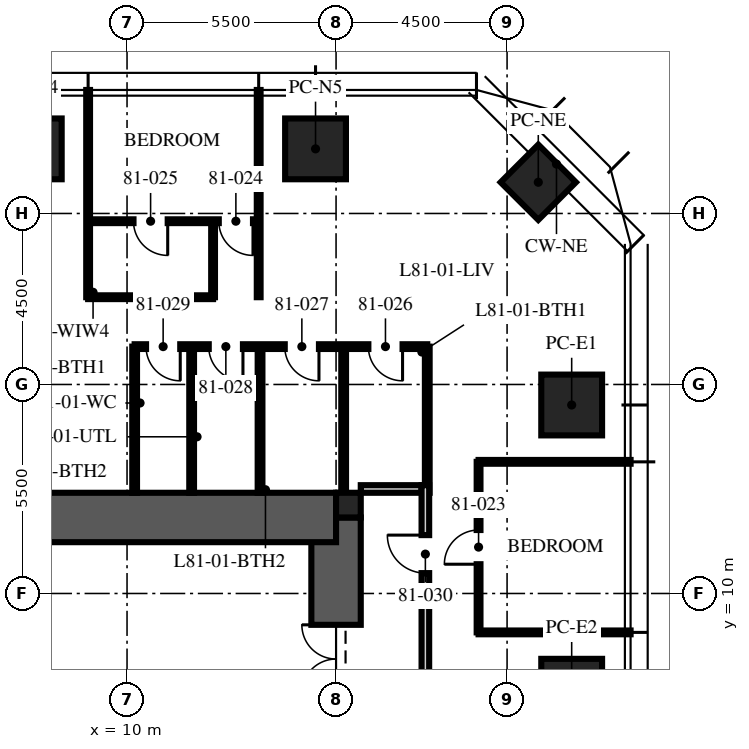
"""IFC4 building model, lengths in metres.
Left out: names, types, materials, properties, quantities, classifications, styles, units other than length and angle.
Written with IfcOpenShell. Run it as: python <this file> out.ifc"""

import sys

from ifc_helpers import new_model, si_unit, direction, frame, frame_2d, origin, origin_2d, place, context, subcontext, project, spatial, rectangle, extrude, element, fill, save


model = new_model("IFC4")
c1 = context("Model", 3, precision=1e-05, world=origin(), true_north=direction((0.0, 1.0)))
c2 = subcontext(c1, "Body", "Model", "MODEL_VIEW")
j1 = project(units=[si_unit("LENGTHUNIT", "METRE"), si_unit("PLANEANGLEUNIT", "RADIAN")], contexts=[c1])
p1 = place(None, origin())
s1 = spatial("IfcSite", under=j1, at=p1, CompositionType="ELEMENT")
p2 = place(p1, origin())
s2 = spatial("IfcBuilding", under=s1, at=p2, CompositionType="ELEMENT")
p3 = place(p2, frame((0.0, 0.0, 323.25)))
s3 = spatial("IfcBuildingStorey", under=s2, at=p3, CompositionType="ELEMENT", Elevation=323.25)
p4 = place(p3, frame((15.5, -12.0, -0.25), z_axis=(0.0, 0.0, 1.0), x_axis=(0.0, 1.0, 0.0)))
e1 = element("IfcWall", 1, at=p4, inside=s3, PredefinedType="SHEAR", context=c2, shape_type="SweptSolid", body=[
    extrude(rectangle(XDim=24.0, YDim=1.3, at=frame_2d((12.0, 0.0))), origin(), (0.0, 0.0, 1.0), 3.75),
])
p5 = place(p4, frame((3.125, 0.0, 0.25)))
e2 = element("IfcOpeningElement", 2, at=p5, cuts=e1, PredefinedType="OPENING", context=c2, shape_type="SweptSolid", body=[
    extrude(rectangle(XDim=1.2, YDim=2.1, at=frame_2d((0.6, 1.05))), frame((0.0, 0.66, 0.0), z_axis=(0.0, -1.0, 0.0), x_axis=(1.0, 0.0, 0.0)), (0.0, 0.0, 1.0), 1.32),
])
p6 = place(p4, frame((19.375, 0.0, 0.25)))
e3 = element("IfcOpeningElement", 3, at=p6, cuts=e1, PredefinedType="OPENING", context=c2, shape_type="SweptSolid", body=[
    extrude(rectangle(XDim=1.8, YDim=2.1, at=frame_2d((0.9, 1.05))), frame((0.0, 0.66, 0.0), z_axis=(0.0, -1.0, 0.0), x_axis=(1.0, 0.0, 0.0)), (0.0, 0.0, 1.0), 1.32),
])
p7 = place(p3, frame((-15.5, 12.0, -0.25), z_axis=(0.0, 0.0, 1.0), x_axis=(1.0, 0.0, 0.0)))
e4 = element("IfcWall", 4, at=p7, inside=s3, PredefinedType="SHEAR", context=c2, shape_type="SweptSolid", body=[
    extrude(rectangle(XDim=31.0, YDim=1.3, at=frame_2d((15.5, 0.0))), origin(), (0.0, 0.0, 1.0), 3.75),
])
p8 = place(p3, frame((15.825, 12.325, -0.25), z_axis=(0.0, 0.0, 1.0), x_axis=(1.0, 0.0, 0.0)))
e5 = element("IfcColumn", 5, at=p8, inside=s3, PredefinedType="COLUMN", context=c2, shape_type="SweptSolid", body=[
    extrude(rectangle(XDim=0.65, YDim=0.65, at=origin_2d()), origin(), (0.0, 0.0, 1.0), 3.75),
])
for number, where, z_axis, x_axis in (
    (6, (7.48, 21.7, 0.0), (0.0, 0.0, 1.0), (1.0, 0.0, 0.0)),
    (7, (14.96, 21.7, 0.0), (0.0, 0.0, 1.0), (1.0, 0.0, 0.0)),
    (8, (21.7, 14.96, 0.0), (0.0, 0.0, 1.0), (0.0, 1.0, 0.0)),
    (9, (21.7, 7.48, 0.0), (0.0, 0.0, 1.0), (0.0, 1.0, 0.0)),
):
    element("IfcColumn", number, at=place(p3, frame(where, z_axis=z_axis, x_axis=x_axis)), inside=s3, PredefinedType="COLUMN", context=c2, shape_type="SweptSolid", body=[
        extrude(rectangle(XDim=1.6, YDim=1.6, at=origin_2d()), origin(), (0.0, 0.0, 1.0), 3.75),
    ])
p9 = place(p3, frame((20.821, 20.821, 0.0), z_axis=(0.0, 0.0, 1.0), x_axis=(0.707106781187, -0.707106781187, 0.0)))
e10 = element("IfcColumn", 10, at=p9, inside=s3, PredefinedType="COLUMN", context=c2, shape_type="SweptSolid", body=[
    extrude(rectangle(XDim=1.4, YDim=1.4, at=origin_2d()), origin(), (0.0, 0.0, 1.0), 3.75),
])
p10 = place(p3, frame((16.15, 12.75, 0.0), z_axis=(0.0, 0.0, 1.0), x_axis=(1.0, 0.0, 0.0)))
e11 = element("IfcWall", 11, at=p10, inside=s3, PredefinedType="PARTITIONING", context=c2, shape_type="SweptSolid", body=[
    extrude(rectangle(XDim=1.6, YDim=0.2, at=frame_2d((0.8, 0.0))), origin(), (0.0, 0.0, 1.0), 2.6),
])
for number, where, z_axis, x_axis in (
    (12, (19.25, 8.976, 0.0), (0.0, 0.0, 1.0), (1.0, 0.0, 0.0)),
    (13, (19.25, 13.464, 0.0), (0.0, 0.0, 1.0), (1.0, 0.0, 0.0)),
):
    element("IfcWall", number, at=place(p3, frame(where, z_axis=z_axis, x_axis=x_axis)), inside=s3, PredefinedType="PARTITIONING", context=c2, shape_type="SweptSolid", body=[
        extrude(rectangle(XDim=4.0, YDim=0.1, at=frame_2d((2.0, 0.0))), origin(), (0.0, 0.0, 1.0), 3.01),
    ])
for number, where, z_axis, x_axis in (
    (14, (13.464, 17.796, 0.0), (0.0, 0.0, 1.0), (0.0, 1.0, 0.0)),
    (15, (8.976, 17.796, 0.0), (0.0, 0.0, 1.0), (0.0, 1.0, 0.0)),
):
    element("IfcWall", number, at=place(p3, frame(where, z_axis=z_axis, x_axis=x_axis)), inside=s3, PredefinedType="PARTITIONING", context=c2, shape_type="SweptSolid", body=[
        extrude(rectangle(XDim=5.454, YDim=0.1, at=frame_2d((2.727, 0.0))), origin(), (0.0, 0.0, 1.0), 3.01),
    ])
p11 = place(p3, frame((19.25, 8.976, 0.0), z_axis=(0.0, 0.0, 1.0), x_axis=(0.0, 1.0, 0.0)))
e16 = element("IfcWall", 16, at=p11, inside=s3, PredefinedType="PARTITIONING", context=c2, shape_type="SweptSolid", body=[
    extrude(rectangle(XDim=4.488, YDim=0.1, at=frame_2d((2.244, 0.0))), origin(), (0.0, 0.0, 1.0), 2.91),
])
p12 = place(p11, frame((1.794, 0.0, 0.0)))
e17 = element("IfcOpeningElement", 17, at=p12, cuts=e16, PredefinedType="OPENING", context=c2, shape_type="SweptSolid", body=[
    extrude(rectangle(XDim=0.9, YDim=2.1, at=frame_2d((0.45, 1.05))), frame((0.0, 0.06, 0.0), z_axis=(0.0, -1.0, 0.0), x_axis=(1.0, 0.0, 0.0)), (0.0, 0.0, 1.0), 0.12),
])
p13 = place(p3, frame((13.464, 19.796, 0.0), z_axis=(0.0, 0.0, 1.0), x_axis=(-1.0, 0.0, 0.0)))
e18 = element("IfcWall", 18, at=p13, inside=s3, PredefinedType="PARTITIONING", context=c2, shape_type="SweptSolid", body=[
    extrude(rectangle(XDim=4.488, YDim=0.1, at=frame_2d((2.244, 0.0))), origin(), (0.0, 0.0, 1.0), 2.91),
])
p14 = place(p13, frame((0.15, 0.0, 0.0)))
e19 = element("IfcOpeningElement", 19, at=p14, cuts=e18, PredefinedType="OPENING", context=c2, shape_type="SweptSolid", body=[
    extrude(rectangle(XDim=0.9, YDim=2.1, at=frame_2d((0.45, 1.05))), frame((0.0, 0.06, 0.0), z_axis=(0.0, -1.0, 0.0), x_axis=(1.0, 0.0, 0.0)), (0.0, 0.0, 1.0), 0.12),
])
p15 = place(p13, frame((2.394, 0.0, 0.0)))
e20 = element("IfcOpeningElement", 20, at=p15, cuts=e18, PredefinedType="OPENING", context=c2, shape_type="SweptSolid", body=[
    extrude(rectangle(XDim=0.9, YDim=2.1, at=frame_2d((0.45, 1.05))), frame((0.0, 0.06, 0.0), z_axis=(0.0, -1.0, 0.0), x_axis=(1.0, 0.0, 0.0)), (0.0, 0.0, 1.0), 0.12),
])
p16 = place(p3, frame((12.264, 17.796, 0.0), z_axis=(0.0, 0.0, 1.0), x_axis=(0.0, 1.0, 0.0)))
e21 = element("IfcWall", 21, at=p16, inside=s3, PredefinedType="PARTITIONING", context=c2, shape_type="SweptSolid", body=[
    extrude(rectangle(XDim=2.0, YDim=0.1, at=frame_2d((1.0, 0.0))), origin(), (0.0, 0.0, 1.0), 3.5),
])
p17 = place(p3, frame((12.264, 17.796, 0.0), z_axis=(0.0, 0.0, 1.0), x_axis=(-1.0, 0.0, 0.0)))
e22 = element("IfcWall", 22, at=p17, inside=s3, PredefinedType="PARTITIONING", context=c2, shape_type="SweptSolid", body=[
    extrude(rectangle(XDim=3.288, YDim=0.1, at=frame_2d((1.644, 0.0))), origin(), (0.0, 0.0, 1.0), 2.91),
])
p18 = place(p3, frame((17.9, 16.496, 0.0), z_axis=(0.0, 0.0, 1.0), x_axis=(-1.0, 0.0, 0.0)))
e23 = element("IfcWall", 23, at=p18, inside=s3, PredefinedType="PARTITIONING", context=c2, shape_type="SweptSolid", body=[
    extrude(rectangle(XDim=7.7, YDim=0.125, at=frame_2d((3.85, 0.0))), origin(), (0.0, 0.0, 1.0), 2.9),
])
p19 = place(p18, frame((0.65, 0.0, 0.0)))
e24 = element("IfcOpeningElement", 24, at=p19, cuts=e23, PredefinedType="OPENING", context=c2, shape_type="SweptSolid", body=[
    extrude(rectangle(XDim=0.9, YDim=2.1, at=frame_2d((0.45, 1.05))), frame((0.0, 0.073, 0.0), z_axis=(0.0, -1.0, 0.0), x_axis=(1.0, 0.0, 0.0)), (0.0, 0.0, 1.0), 0.145),
])
p20 = place(p18, frame((2.85, 0.0, 0.0)))
e25 = element("IfcOpeningElement", 25, at=p20, cuts=e23, PredefinedType="OPENING", context=c2, shape_type="SweptSolid", body=[
    extrude(rectangle(XDim=0.9, YDim=2.1, at=frame_2d((0.45, 1.05))), frame((0.0, 0.073, 0.0), z_axis=(0.0, -1.0, 0.0), x_axis=(1.0, 0.0, 0.0)), (0.0, 0.0, 1.0), 0.145),
])
p21 = place(p18, frame((4.85, 0.0, 0.0)))
e26 = element("IfcOpeningElement", 26, at=p21, cuts=e23, PredefinedType="OPENING", context=c2, shape_type="SweptSolid", body=[
    extrude(rectangle(XDim=0.9, YDim=2.1, at=frame_2d((0.45, 1.05))), frame((0.0, 0.073, 0.0), z_axis=(0.0, -1.0, 0.0), x_axis=(1.0, 0.0, 0.0)), (0.0, 0.0, 1.0), 0.145),
])
p22 = place(p18, frame((6.5, 0.0, 0.0)))
e27 = element("IfcOpeningElement", 27, at=p22, cuts=e23, PredefinedType="OPENING", context=c2, shape_type="SweptSolid", body=[
    extrude(rectangle(XDim=0.9, YDim=2.1, at=frame_2d((0.45, 1.05))), frame((0.0, 0.073, 0.0), z_axis=(0.0, -1.0, 0.0), x_axis=(1.0, 0.0, 0.0)), (0.0, 0.0, 1.0), 0.145),
])
for number, where, z_axis, x_axis in (
    (28, (17.9, 12.65, 0.0), (0.0, 0.0, 1.0), (0.0, 1.0, 0.0)),
    (29, (15.7, 12.65, 0.0), (0.0, 0.0, 1.0), (0.0, 1.0, 0.0)),
):
    element("IfcWall", number, at=place(p3, frame(where, z_axis=z_axis, x_axis=x_axis)), inside=s3, PredefinedType="PARTITIONING", context=c2, shape_type="SweptSolid", body=[
        extrude(rectangle(XDim=3.846, YDim=0.125, at=frame_2d((1.923, 0.0))), origin(), (0.0, 0.0, 1.0), 2.6),
    ])
for number, where, z_axis, x_axis in (
    (30, (13.5, 12.65, 0.0), (0.0, 0.0, 1.0), (0.0, 1.0, 0.0)),
    (31, (11.7, 12.65, 0.0), (0.0, 0.0, 1.0), (0.0, 1.0, 0.0)),
    (32, (10.2, 12.65, 0.0), (0.0, 0.0, 1.0), (0.0, 1.0, 0.0)),
):
    element("IfcWall", number, at=place(p3, frame(where, z_axis=z_axis, x_axis=x_axis)), inside=s3, PredefinedType="PARTITIONING", context=c2, shape_type="SweptSolid", body=[
        extrude(rectangle(XDim=3.846, YDim=0.125, at=frame_2d((1.923, 0.0))), origin(), (0.0, 0.0, 1.0), 3.5),
    ])
p23 = place(p3, frame((17.85, -12.85, 0.0), z_axis=(0.0, 0.0, 1.0), x_axis=(0.0, 1.0, 0.0)))
e33 = element("IfcWall", 33, at=p23, inside=s3, PredefinedType="PARTITIONING", context=c2, shape_type="SweptSolid", body=[
    extrude(rectangle(XDim=25.7, YDim=0.2, at=frame_2d((12.85, 0.0))), origin(), (0.0, 0.0, 1.0), 2.9),
])
p24 = place(p23, frame((23.386, 0.0, 0.0)))
e34 = element("IfcOpeningElement", 34, at=p24, cuts=e33, PredefinedType="OPENING", context=c2, shape_type="SweptSolid", body=[
    extrude(rectangle(XDim=1.0, YDim=2.2, at=frame_2d((0.5, 1.1))), frame((0.0, 0.11, 0.0), z_axis=(0.0, -1.0, 0.0), x_axis=(1.0, 0.0, 0.0)), (0.0, 0.0, 1.0), 0.22),
])
p25 = place(p23, frame((5.1, 0.0, 0.0)))
e35 = element("IfcOpeningElement", 35, at=p25, cuts=e33, PredefinedType="OPENING", context=c2, shape_type="SweptSolid", body=[
    extrude(rectangle(XDim=1.0, YDim=2.2, at=frame_2d((0.5, 1.1))), frame((0.0, 0.11, 0.0), z_axis=(0.0, -1.0, 0.0), x_axis=(1.0, 0.0, 0.0)), (0.0, 0.0, 1.0), 0.22),
])
p26 = place(p6, origin())
e36 = element("IfcDoor", 36, at=p26, inside=s3, OperationType="DOUBLE_DOOR_SINGLE_SWING", PredefinedType="DOOR", context=c2, shape_type="SweptSolid", body=[
    extrude(rectangle(XDim=1.8, YDim=2.1, at=frame_2d((0.9, 1.05))), frame((0.0, 0.025, 0.0), z_axis=(0.0, -1.0, 0.0), x_axis=(1.0, 0.0, 0.0)), (0.0, 0.0, 1.0), 0.05),
])
fill(e3, e36)
p27 = place(p12, origin())
e37 = element("IfcDoor", 37, at=p27, inside=s3, OperationType="SINGLE_SWING_LEFT", PredefinedType="DOOR", context=c2, shape_type="SweptSolid", body=[
    extrude(rectangle(XDim=0.9, YDim=2.1, at=frame_2d((0.45, 1.05))), frame((0.0, 0.025, 0.0), z_axis=(0.0, -1.0, 0.0), x_axis=(1.0, 0.0, 0.0)), (0.0, 0.0, 1.0), 0.05),
])
fill(e17, e37)
p28 = place(p14, origin())
e38 = element("IfcDoor", 38, at=p28, inside=s3, OperationType="SINGLE_SWING_LEFT", PredefinedType="DOOR", context=c2, shape_type="SweptSolid", body=[
    extrude(rectangle(XDim=0.9, YDim=2.1, at=frame_2d((0.45, 1.05))), frame((0.0, 0.025, 0.0), z_axis=(0.0, -1.0, 0.0), x_axis=(1.0, 0.0, 0.0)), (0.0, 0.0, 1.0), 0.05),
])
fill(e19, e38)
p29 = place(p15, origin())
e39 = element("IfcDoor", 39, at=p29, inside=s3, OperationType="SINGLE_SWING_LEFT", PredefinedType="DOOR", context=c2, shape_type="SweptSolid", body=[
    extrude(rectangle(XDim=0.9, YDim=2.1, at=frame_2d((0.45, 1.05))), frame((0.0, 0.025, 0.0), z_axis=(0.0, -1.0, 0.0), x_axis=(1.0, 0.0, 0.0)), (0.0, 0.0, 1.0), 0.05),
])
fill(e20, e39)
p30 = place(p19, origin())
e40 = element("IfcDoor", 40, at=p30, inside=s3, OperationType="SINGLE_SWING_LEFT", PredefinedType="DOOR", context=c2, shape_type="SweptSolid", body=[
    extrude(rectangle(XDim=0.9, YDim=2.1, at=frame_2d((0.45, 1.05))), frame((0.0, 0.025, 0.0), z_axis=(0.0, -1.0, 0.0), x_axis=(1.0, 0.0, 0.0)), (0.0, 0.0, 1.0), 0.05),
])
fill(e24, e40)
p31 = place(p20, origin())
e41 = element("IfcDoor", 41, at=p31, inside=s3, OperationType="SINGLE_SWING_LEFT", PredefinedType="DOOR", context=c2, shape_type="SweptSolid", body=[
    extrude(rectangle(XDim=0.9, YDim=2.1, at=frame_2d((0.45, 1.05))), frame((0.0, 0.025, 0.0), z_axis=(0.0, -1.0, 0.0), x_axis=(1.0, 0.0, 0.0)), (0.0, 0.0, 1.0), 0.05),
])
fill(e25, e41)
p32 = place(p21, origin())
e42 = element("IfcDoor", 42, at=p32, inside=s3, OperationType="SINGLE_SWING_LEFT", PredefinedType="DOOR", context=c2, shape_type="SweptSolid", body=[
    extrude(rectangle(XDim=0.9, YDim=2.1, at=frame_2d((0.45, 1.05))), frame((0.0, 0.025, 0.0), z_axis=(0.0, -1.0, 0.0), x_axis=(1.0, 0.0, 0.0)), (0.0, 0.0, 1.0), 0.05),
])
fill(e26, e42)
p33 = place(p22, origin())
e43 = element("IfcDoor", 43, at=p33, inside=s3, OperationType="SINGLE_SWING_LEFT", PredefinedType="DOOR", context=c2, shape_type="SweptSolid", body=[
    extrude(rectangle(XDim=0.9, YDim=2.1, at=frame_2d((0.45, 1.05))), frame((0.0, 0.025, 0.0), z_axis=(0.0, -1.0, 0.0), x_axis=(1.0, 0.0, 0.0)), (0.0, 0.0, 1.0), 0.05),
])
fill(e27, e43)
p34 = place(p24, origin())
e44 = element("IfcDoor", 44, at=p34, inside=s3, OperationType="SINGLE_SWING_RIGHT", PredefinedType="DOOR", context=c2, shape_type="SweptSolid", body=[
    extrude(rectangle(XDim=1.0, YDim=2.2, at=frame_2d((0.5, 1.1))), frame((0.0, 0.025, 0.0), z_axis=(0.0, -1.0, 0.0), x_axis=(1.0, 0.0, 0.0)), (0.0, 0.0, 1.0), 0.05),
])
fill(e34, e44)
save(model, sys.argv[1])
